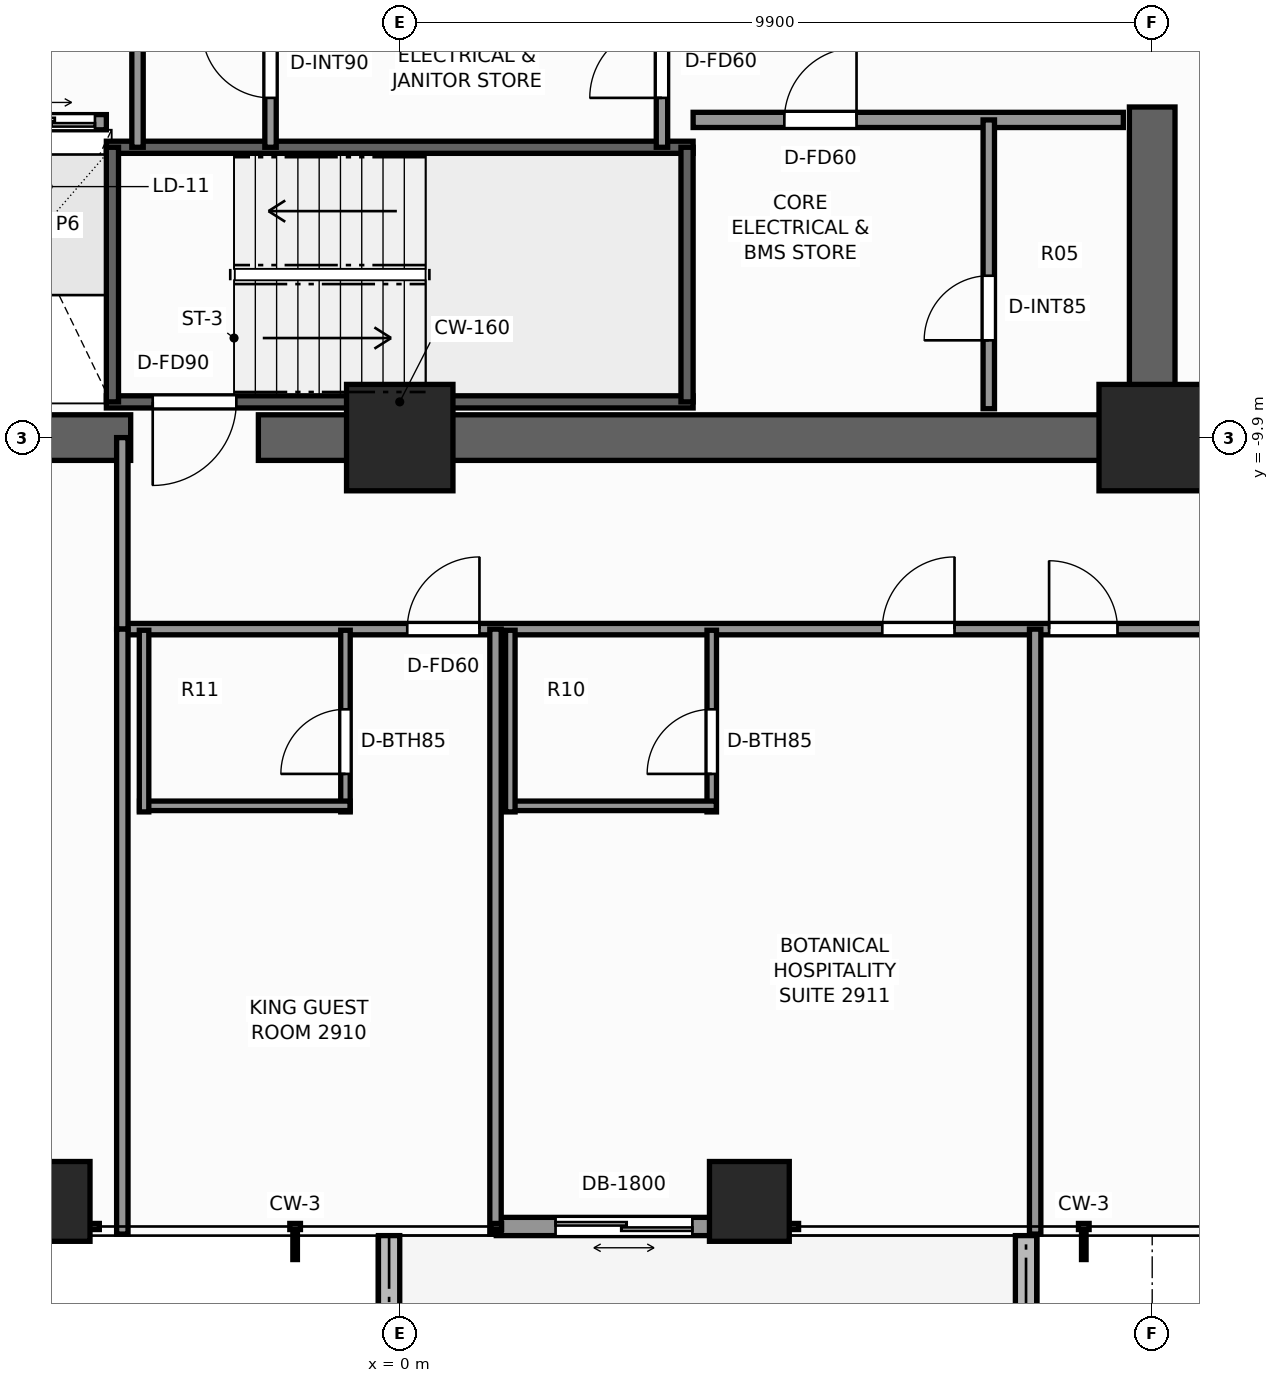
"""IFC4 building model, lengths in metres.
Left out: names, types, materials, properties, quantities, classifications, styles, units other than length and angle.
Written with IfcOpenShell. Run it as: python <this file> out.ifc"""

import sys

from ifc_helpers import new_model, si_unit, direction, frame, frame_2d, origin, origin_2d, place, context, subcontext, project, spatial, rectangle, extrude, element, fill, save


model = new_model("IFC4")
c1 = context("Model", 3, precision=1e-05, world=origin(), true_north=direction((0.0, 1.0)))
c2 = subcontext(c1, "Body", "Model", "MODEL_VIEW")
j1 = project(units=[si_unit("LENGTHUNIT", "METRE"), si_unit("PLANEANGLEUNIT", "RADIAN")], contexts=[c1])
p1 = place(None, origin())
s1 = spatial("IfcSite", under=j1, at=p1, CompositionType="ELEMENT")
p2 = place(p1, origin())
s2 = spatial("IfcBuilding", under=s1, at=p2, CompositionType="ELEMENT")
p3 = place(p2, frame((0.0, 0.0, 101.9)))
s3 = spatial("IfcBuildingStorey", under=s2, at=p3, CompositionType="ELEMENT", Elevation=101.9)
p4 = place(p3, frame((10.2, -9.9, 0.0), z_axis=(0.0, 0.0, 1.0), x_axis=(-1.0, 0.0, 0.0)))
e1 = element("IfcWall", 1, at=p4, inside=s3, PredefinedType="SHEAR", context=c2, shape_type="SweptSolid", body=[
    extrude(rectangle(XDim=12.06, YDim=0.6, at=frame_2d((6.03, 0.0))), origin(), (0.0, 0.0, 1.0), 3.3),
])
p5 = place(p3, frame((-3.54, -9.9, 0.0), z_axis=(0.0, 0.0, 1.0), x_axis=(-1.0, 0.0, 0.0)))
e2 = element("IfcWall", 2, at=p5, inside=s3, PredefinedType="SHEAR", context=c2, shape_type="SweptSolid", body=[
    extrude(rectangle(XDim=6.66, YDim=0.6, at=frame_2d((3.33, 0.0))), origin(), (0.0, 0.0, 1.0), 3.3),
])
p6 = place(p3, frame((9.9, -9.6, 0.0), z_axis=(0.0, 0.0, 1.0), x_axis=(0.0, 1.0, 0.0)))
e3 = element("IfcWall", 3, at=p6, inside=s3, PredefinedType="SHEAR", context=c2, shape_type="SweptSolid", body=[
    extrude(rectangle(XDim=4.05, YDim=0.6, at=frame_2d((2.025, 0.0))), origin(), (0.0, 0.0, 1.0), 3.3),
])
for number, where, z_axis, x_axis in (
    (4, (9.9, -9.9, 0.0), (0.0, 0.0, 1.0), (1.0, 0.0, 0.0)),
    (5, (0.0, -9.9, 0.0), (0.0, 0.0, 1.0), (1.0, 0.0, 0.0)),
):
    element("IfcColumn", number, at=place(p3, frame(where, z_axis=z_axis, x_axis=x_axis)), inside=s3, PredefinedType="COLUMN", context=c2, shape_type="SweptSolid", body=[
        extrude(rectangle(XDim=1.4, YDim=1.4, at=origin_2d()), origin(), (0.0, 0.0, 1.0), 3.3),
    ])
for number, where, z_axis, x_axis in (
    (6, (-4.6, -19.95, 0.0), (0.0, 0.0, 1.0), (1.0, 0.0, 0.0)),
    (7, (4.6, -19.95, 0.0), (0.0, 0.0, 1.0), (1.0, 0.0, 0.0)),
):
    element("IfcColumn", number, at=place(p3, frame(where, z_axis=z_axis, x_axis=x_axis)), inside=s3, PredefinedType="COLUMN", context=c2, shape_type="SweptSolid", body=[
        extrude(rectangle(XDim=1.05, YDim=1.05, at=origin_2d()), origin(), (0.0, 0.0, 1.0), 3.3),
    ])
for number, where, z_axis, x_axis in (
    (8, (8.24, -23.7, -0.04), (0.0, 0.0, 1.0), (0.0, 1.0, 0.0)),
    (9, (-0.14, -20.4, -0.04), (0.0, 0.0, 1.0), (0.0, -1.0, 0.0)),
):
    element("IfcWall", number, at=place(p3, frame(where, z_axis=z_axis, x_axis=x_axis)), inside=s3, PredefinedType="PARAPET", context=c2, shape_type="SweptSolid", body=[
        extrude(rectangle(XDim=3.3, YDim=0.28, at=frame_2d((1.65, 0.0))), origin(), (0.0, 0.0, 1.0), 0.42),
    ])
p7 = place(p3, frame((4.63, -20.28, 0.0), z_axis=(0.0, 0.0, 1.0), x_axis=(-1.0, 0.0, 0.0)))
e10 = element("IfcWall", 10, at=p7, inside=s3, PredefinedType="STANDARD", context=c2, shape_type="SweptSolid", body=[
    extrude(rectangle(XDim=3.36, YDim=0.24, at=frame_2d((1.68, 0.0))), origin(), (0.0, 0.0, 1.0), 3.08),
])
p8 = place(p7, frame((0.78, 0.0, 0.0)))
e11 = element("IfcOpeningElement", 11, at=p8, cuts=e10, PredefinedType="OPENING", context=c2, shape_type="SweptSolid", body=[
    extrude(rectangle(XDim=1.8, YDim=2.2, at=frame_2d((0.9, 1.1))), frame((0.0, 0.13, 0.0), z_axis=(0.0, -1.0, 0.0), x_axis=(1.0, 0.0, 0.0)), (0.0, 0.0, 1.0), 0.26),
])
p9 = place(p3, frame((3.86, -9.43, 0.0), z_axis=(0.0, 0.0, 1.0), x_axis=(-1.0, 0.0, 0.0)))
e12 = element("IfcWall", 12, at=p9, inside=s3, PredefinedType="SHEAR", context=c2, shape_type="SweptSolid", body=[
    extrude(rectangle(XDim=7.72, YDim=0.16, at=frame_2d((3.86, 0.0))), origin(), (0.0, 0.0, 1.0), 3.3),
])
p10 = place(p9, frame((6.01, 0.0, 0.0)))
e13 = element("IfcOpeningElement", 13, at=p10, cuts=e12, PredefinedType="OPENING", context=c2, shape_type="SweptSolid", body=[
    extrude(rectangle(XDim=1.1, YDim=2.2, at=frame_2d((0.55, 1.1))), frame((0.0, 0.09, 0.0), z_axis=(0.0, -1.0, 0.0), x_axis=(1.0, 0.0, 0.0)), (0.0, 0.0, 1.0), 0.18),
])
p11 = place(p3, frame((-3.86, -6.08, 0.0), z_axis=(0.0, 0.0, 1.0), x_axis=(1.0, 0.0, 0.0)))
e14 = element("IfcWall", 14, at=p11, inside=s3, PredefinedType="SHEAR", context=c2, shape_type="SweptSolid", body=[
    extrude(rectangle(XDim=7.72, YDim=0.16, at=frame_2d((3.86, 0.0))), origin(), (0.0, 0.0, 1.0), 3.3),
])
for number, where, z_axis, x_axis in (
    (15, (-3.78, -9.43, 0.0), (0.0, 0.0, 1.0), (0.0, 1.0, 0.0)),
    (16, (3.78, -9.43, 0.0), (0.0, 0.0, 1.0), (0.0, 1.0, 0.0)),
):
    element("IfcWall", number, at=place(p3, frame(where, z_axis=z_axis, x_axis=x_axis)), inside=s3, PredefinedType="SHEAR", context=c2, shape_type="SweptSolid", body=[
        extrude(rectangle(XDim=3.35, YDim=0.16, at=frame_2d((1.675, 0.0))), origin(), (0.0, 0.0, 1.0), 3.3),
    ])
p12 = place(p3, frame((-9.52, -5.75, 0.0), z_axis=(0.0, 0.0, 1.0), x_axis=(1.0, 0.0, 0.0)))
e17 = element("IfcWall", 17, at=p12, inside=s3, PredefinedType="SOLIDWALL", context=c2, shape_type="SweptSolid", body=[
    extrude(rectangle(XDim=5.66, YDim=0.2, at=frame_2d((2.83, 0.0))), origin(), (0.0, 0.0, 1.0), 3.08),
])
p13 = place(p12, frame((0.55, 0.0, 0.0)))
e18 = element("IfcOpeningElement", 18, at=p13, cuts=e17, PredefinedType="OPENING", context=c2, shape_type="SweptSolid", body=[
    extrude(rectangle(XDim=1.1, YDim=2.2, at=frame_2d((0.55, 1.1))), frame((0.0, 0.11, 0.0), z_axis=(0.0, -1.0, 0.0), x_axis=(1.0, 0.0, 0.0)), (0.0, 0.0, 1.0), 0.22),
])
p14 = place(p12, frame((2.48, 0.0, 0.0)))
e19 = element("IfcOpeningElement", 19, at=p14, cuts=e17, PredefinedType="OPENING", context=c2, shape_type="SweptSolid", body=[
    extrude(rectangle(XDim=1.1, YDim=2.2, at=frame_2d((0.55, 1.1))), frame((0.0, 0.11, 0.0), z_axis=(0.0, -1.0, 0.0), x_axis=(1.0, 0.0, 0.0)), (0.0, 0.0, 1.0), 0.22),
])
p15 = place(p12, frame((4.41, 0.0, 0.0)))
e20 = element("IfcOpeningElement", 20, at=p15, cuts=e17, PredefinedType="OPENING", context=c2, shape_type="SweptSolid", body=[
    extrude(rectangle(XDim=1.1, YDim=2.2, at=frame_2d((0.55, 1.1))), frame((0.0, 0.11, 0.0), z_axis=(0.0, -1.0, 0.0), x_axis=(1.0, 0.0, 0.0)), (0.0, 0.0, 1.0), 0.22),
])
p16 = place(p3, frame((3.86, -5.72, 0.0), z_axis=(0.0, 0.0, 1.0), x_axis=(1.0, 0.0, 0.0)))
e21 = element("IfcWall", 21, at=p16, inside=s3, PredefinedType="SOLIDWALL", context=c2, shape_type="SweptSolid", body=[
    extrude(rectangle(XDim=5.66, YDim=0.2, at=frame_2d((2.83, 0.0))), origin(), (0.0, 0.0, 1.0), 3.08),
])
p17 = place(p16, frame((1.2, 0.0, 0.0)))
e22 = element("IfcOpeningElement", 22, at=p17, cuts=e21, PredefinedType="OPENING", context=c2, shape_type="SweptSolid", body=[
    extrude(rectangle(XDim=0.95, YDim=2.06, at=frame_2d((0.475, 1.03))), frame((0.0, 0.11, 0.0), z_axis=(0.0, -1.0, 0.0), x_axis=(1.0, 0.0, 0.0)), (0.0, 0.0, 1.0), 0.22),
])
p18 = place(p3, frame((7.75, -9.52, 0.0), z_axis=(0.0, 0.0, 1.0), x_axis=(0.0, 1.0, 0.0)))
e23 = element("IfcWall", 23, at=p18, inside=s3, PredefinedType="PARTITIONING", context=c2, shape_type="SweptSolid", body=[
    extrude(rectangle(XDim=3.8, YDim=0.15, at=frame_2d((1.9, 0.0))), origin(), (0.0, 0.0, 1.0), 3.08),
])
p19 = place(p18, frame((0.9, 0.0, 0.0)))
e24 = element("IfcOpeningElement", 24, at=p19, cuts=e23, PredefinedType="OPENING", context=c2, shape_type="SweptSolid", body=[
    extrude(rectangle(XDim=0.85, YDim=2.03, at=frame_2d((0.425, 1.015))), frame((0.0, 0.085, 0.0), z_axis=(0.0, -1.0, 0.0), x_axis=(1.0, 0.0, 0.0)), (0.0, 0.0, 1.0), 0.17),
])
p20 = place(p3, frame((3.45, -6.08, 0.0), z_axis=(0.0, 0.0, 1.0), x_axis=(0.0, 1.0, 0.0)))
e25 = element("IfcWall", 25, at=p20, inside=s3, PredefinedType="PARTITIONING", context=c2, shape_type="SweptSolid", body=[
    extrude(rectangle(XDim=2.36, YDim=0.15, at=frame_2d((1.18, 0.0))), origin(), (0.0, 0.0, 1.0), 3.08),
])
p21 = place(p20, frame((0.65, 0.0, 0.0)))
e26 = element("IfcOpeningElement", 26, at=p21, cuts=e25, PredefinedType="OPENING", context=c2, shape_type="SweptSolid", body=[
    extrude(rectangle(XDim=0.95, YDim=2.06, at=frame_2d((0.475, 1.03))), frame((0.0, 0.085, 0.0), z_axis=(0.0, -1.0, 0.0), x_axis=(1.0, 0.0, 0.0)), (0.0, 0.0, 1.0), 0.17),
])
p22 = place(p3, frame((-3.45, -6.08, 0.0), z_axis=(0.0, 0.0, 1.0), x_axis=(0.0, 1.0, 0.0)))
e27 = element("IfcWall", 27, at=p22, inside=s3, PredefinedType="PARTITIONING", context=c2, shape_type="SweptSolid", body=[
    extrude(rectangle(XDim=2.36, YDim=0.15, at=frame_2d((1.18, 0.0))), origin(), (0.0, 0.0, 1.0), 3.08),
])
p23 = place(p3, frame((-1.7, -6.08, 0.0), z_axis=(0.0, 0.0, 1.0), x_axis=(0.0, 1.0, 0.0)))
e28 = element("IfcWall", 28, at=p23, inside=s3, PredefinedType="PARTITIONING", context=c2, shape_type="SweptSolid", body=[
    extrude(rectangle(XDim=2.36, YDim=0.15, at=frame_2d((1.18, 0.0))), origin(), (0.0, 0.0, 1.0), 3.08),
])
p24 = place(p23, frame((0.65, 0.0, 0.0)))
e29 = element("IfcOpeningElement", 29, at=p24, cuts=e28, PredefinedType="OPENING", context=c2, shape_type="SweptSolid", body=[
    extrude(rectangle(XDim=0.9, YDim=2.06, at=frame_2d((0.45, 1.03))), frame((0.0, 0.085, 0.0), z_axis=(0.0, -1.0, 0.0), x_axis=(1.0, 0.0, 0.0)), (0.0, 0.0, 1.0), 0.17),
])
p25 = place(p3, frame((-3.65, -12.42, 0.0), z_axis=(0.0, 0.0, 1.0), x_axis=(1.0, 0.0, 0.0)))
e30 = element("IfcWall", 30, at=p25, inside=s3, PredefinedType="PARTITIONING", context=c2, shape_type="SweptSolid", body=[
    extrude(rectangle(XDim=15.91, YDim=0.15, at=frame_2d((7.955, 0.0))), origin(), (0.0, 0.0, 1.0), 2.292),
])
p26 = place(p25, frame((3.749, 0.0, 0.0)))
e31 = element("IfcOpeningElement", 31, at=p26, cuts=e30, PredefinedType="OPENING", context=c2, shape_type="SweptSolid", body=[
    extrude(rectangle(XDim=0.95, YDim=2.06, at=frame_2d((0.475, 1.03))), frame((0.0, 0.085, 0.0), z_axis=(0.0, -1.0, 0.0), x_axis=(1.0, 0.0, 0.0)), (0.0, 0.0, 1.0), 0.17),
])
p27 = place(p25, frame((9.999, 0.0, 0.0)))
e32 = element("IfcOpeningElement", 32, at=p27, cuts=e30, PredefinedType="OPENING", context=c2, shape_type="SweptSolid", body=[
    extrude(rectangle(XDim=0.95, YDim=2.06, at=frame_2d((0.475, 1.03))), frame((0.0, 0.085, 0.0), z_axis=(0.0, -1.0, 0.0), x_axis=(1.0, 0.0, 0.0)), (0.0, 0.0, 1.0), 0.17),
])
p28 = place(p25, frame((12.193, 0.0, 0.0)))
e33 = element("IfcOpeningElement", 33, at=p28, cuts=e30, PredefinedType="OPENING", context=c2, shape_type="SweptSolid", body=[
    extrude(rectangle(XDim=0.9, YDim=2.06, at=frame_2d((0.45, 1.03))), frame((0.0, 0.085, 0.0), z_axis=(0.0, -1.0, 0.0), x_axis=(1.0, 0.0, 0.0)), (0.0, 0.0, 1.0), 0.17),
])
p29 = place(p3, frame((-3.65, -12.42, 0.0), z_axis=(0.0, 0.0, 1.0), x_axis=(0.0, 1.0, 0.0)))
e34 = element("IfcWall", 34, at=p29, inside=s3, PredefinedType="PARTITIONING", context=c2, shape_type="SweptSolid", body=[
    extrude(rectangle(XDim=2.52, YDim=0.15, at=frame_2d((1.26, 0.0))), origin(), (0.0, 0.0, 1.0), 3.08),
])
for number, where, z_axis, x_axis in (
    (35, (-3.65, -20.38, 0.0), (0.0, 0.0, 1.0), (0.0, 1.0, 0.0)),
    (36, (1.26, -20.38, 0.0), (0.0, 0.0, 1.0), (0.0, 1.0, 0.0)),
):
    element("IfcWall", number, at=place(p3, frame(where, z_axis=z_axis, x_axis=x_axis)), inside=s3, PredefinedType="PARTITIONING", context=c2, shape_type="SweptSolid", body=[
        extrude(rectangle(XDim=7.96, YDim=0.15, at=frame_2d((3.98, 0.0))), origin(), (0.0, 0.0, 1.0), 2.449),
    ])
p30 = place(p3, frame((-0.714, -14.825, 0.0), z_axis=(0.0, 0.0, 1.0), x_axis=(0.0, 1.0, 0.0)))
e37 = element("IfcWall", 37, at=p30, inside=s3, PredefinedType="PARTITIONING", context=c2, shape_type="SweptSolid", body=[
    extrude(rectangle(XDim=2.39, YDim=0.125, at=frame_2d((1.195, 0.0))), origin(), (0.0, 0.0, 1.0), 3.08),
])
p31 = place(p30, frame((0.5, 0.0, 0.0)))
e38 = element("IfcOpeningElement", 38, at=p31, cuts=e37, PredefinedType="OPENING", context=c2, shape_type="SweptSolid", body=[
    extrude(rectangle(XDim=0.85, YDim=2.03, at=frame_2d((0.425, 1.015))), frame((0.0, 0.073, 0.0), z_axis=(0.0, -1.0, 0.0), x_axis=(1.0, 0.0, 0.0)), (0.0, 0.0, 1.0), 0.145),
])
p32 = place(p3, frame((-3.424, -14.745, 0.0), z_axis=(0.0, 0.0, 1.0), x_axis=(1.0, 0.0, 0.0)))
e39 = element("IfcWall", 39, at=p32, inside=s3, PredefinedType="PARTITIONING", context=c2, shape_type="SweptSolid", body=[
    extrude(rectangle(XDim=2.77, YDim=0.125, at=frame_2d((1.385, 0.0))), origin(), (0.0, 0.0, 1.0), 3.08),
])
p33 = place(p3, frame((-3.364, -14.825, 0.0), z_axis=(0.0, 0.0, 1.0), x_axis=(0.0, 1.0, 0.0)))
e40 = element("IfcWall", 40, at=p33, inside=s3, PredefinedType="PARTITIONING", context=c2, shape_type="SweptSolid", body=[
    extrude(rectangle(XDim=2.39, YDim=0.125, at=frame_2d((1.195, 0.0))), origin(), (0.0, 0.0, 1.0), 3.08),
])
p34 = place(p3, frame((8.36, -20.38, 0.0), z_axis=(0.0, 0.0, 1.0), x_axis=(0.0, 1.0, 0.0)))
e41 = element("IfcWall", 41, at=p34, inside=s3, PredefinedType="PARTITIONING", context=c2, shape_type="SweptSolid", body=[
    extrude(rectangle(XDim=7.96, YDim=0.15, at=frame_2d((3.98, 0.0))), origin(), (0.0, 0.0, 1.0), 2.449),
])
p35 = place(p3, frame((4.105, -14.825, 0.0), z_axis=(0.0, 0.0, 1.0), x_axis=(0.0, 1.0, 0.0)))
e42 = element("IfcWall", 42, at=p35, inside=s3, PredefinedType="PARTITIONING", context=c2, shape_type="SweptSolid", body=[
    extrude(rectangle(XDim=2.39, YDim=0.125, at=frame_2d((1.195, 0.0))), origin(), (0.0, 0.0, 1.0), 3.08),
])
p36 = place(p35, frame((0.5, 0.0, 0.0)))
e43 = element("IfcOpeningElement", 43, at=p36, cuts=e42, PredefinedType="OPENING", context=c2, shape_type="SweptSolid", body=[
    extrude(rectangle(XDim=0.85, YDim=2.03, at=frame_2d((0.425, 1.015))), frame((0.0, 0.073, 0.0), z_axis=(0.0, -1.0, 0.0), x_axis=(1.0, 0.0, 0.0)), (0.0, 0.0, 1.0), 0.145),
])
p37 = place(p3, frame((1.395, -14.745, 0.0), z_axis=(0.0, 0.0, 1.0), x_axis=(1.0, 0.0, 0.0)))
e44 = element("IfcWall", 44, at=p37, inside=s3, PredefinedType="PARTITIONING", context=c2, shape_type="SweptSolid", body=[
    extrude(rectangle(XDim=2.77, YDim=0.125, at=frame_2d((1.385, 0.0))), origin(), (0.0, 0.0, 1.0), 3.08),
])
p38 = place(p3, frame((1.455, -14.825, 0.0), z_axis=(0.0, 0.0, 1.0), x_axis=(0.0, 1.0, 0.0)))
e45 = element("IfcWall", 45, at=p38, inside=s3, PredefinedType="PARTITIONING", context=c2, shape_type="SweptSolid", body=[
    extrude(rectangle(XDim=2.39, YDim=0.125, at=frame_2d((1.195, 0.0))), origin(), (0.0, 0.0, 1.0), 3.08),
])
p39 = place(p8, origin())
e46 = element("IfcDoor", 46, at=p39, inside=s3, OperationType="DOUBLE_DOOR_SLIDING", PredefinedType="DOOR", context=c2, shape_type="SweptSolid", body=[
    extrude(rectangle(XDim=1.8, YDim=2.2, at=frame_2d((0.9, 1.1))), frame((0.0, 0.025, 0.0), z_axis=(0.0, -1.0, 0.0), x_axis=(1.0, 0.0, 0.0)), (0.0, 0.0, 1.0), 0.05),
])
fill(e11, e46)
p40 = place(p10, origin())
e47 = element("IfcDoor", 47, at=p40, inside=s3, OperationType="SINGLE_SWING_RIGHT", PredefinedType="DOOR", context=c2, shape_type="SweptSolid", body=[
    extrude(rectangle(XDim=1.1, YDim=2.2, at=frame_2d((0.55, 1.1))), frame((0.0, 0.025, 0.0), z_axis=(0.0, -1.0, 0.0), x_axis=(1.0, 0.0, 0.0)), (0.0, 0.0, 1.0), 0.05),
])
fill(e13, e47)
p41 = place(p15, origin())
e48 = element("IfcDoor", 48, at=p41, inside=s3, OperationType="DOUBLE_DOOR_SLIDING", PredefinedType="DOOR", context=c2, shape_type="SweptSolid", body=[
    extrude(rectangle(XDim=1.1, YDim=2.2, at=frame_2d((0.55, 1.1))), frame((0.0, 0.025, 0.0), z_axis=(0.0, -1.0, 0.0), x_axis=(1.0, 0.0, 0.0)), (0.0, 0.0, 1.0), 0.05),
])
fill(e20, e48)
p42 = place(p17, origin())
e49 = element("IfcDoor", 49, at=p42, inside=s3, OperationType="SINGLE_SWING_RIGHT", PredefinedType="DOOR", context=c2, shape_type="SweptSolid", body=[
    extrude(rectangle(XDim=0.95, YDim=2.06, at=frame_2d((0.475, 1.03))), frame((0.0, 0.025, 0.0), z_axis=(0.0, -1.0, 0.0), x_axis=(1.0, 0.0, 0.0)), (0.0, 0.0, 1.0), 0.05),
])
fill(e22, e49)
p43 = place(p19, origin())
e50 = element("IfcDoor", 50, at=p43, inside=s3, OperationType="SINGLE_SWING_LEFT", PredefinedType="DOOR", context=c2, shape_type="SweptSolid", body=[
    extrude(rectangle(XDim=0.85, YDim=2.03, at=frame_2d((0.425, 1.015))), frame((0.0, 0.025, 0.0), z_axis=(0.0, -1.0, 0.0), x_axis=(1.0, 0.0, 0.0)), (0.0, 0.0, 1.0), 0.05),
])
fill(e24, e50)
p44 = place(p21, origin())
e51 = element("IfcDoor", 51, at=p44, inside=s3, OperationType="SINGLE_SWING_LEFT", PredefinedType="DOOR", context=c2, shape_type="SweptSolid", body=[
    extrude(rectangle(XDim=0.95, YDim=2.06, at=frame_2d((0.475, 1.03))), frame((0.0, 0.025, 0.0), z_axis=(0.0, -1.0, 0.0), x_axis=(1.0, 0.0, 0.0)), (0.0, 0.0, 1.0), 0.05),
])
fill(e26, e51)
p45 = place(p24, origin())
e52 = element("IfcDoor", 52, at=p45, inside=s3, OperationType="SINGLE_SWING_RIGHT", PredefinedType="DOOR", context=c2, shape_type="SweptSolid", body=[
    extrude(rectangle(XDim=0.9, YDim=2.06, at=frame_2d((0.45, 1.03))), frame((0.0, 0.025, 0.0), z_axis=(0.0, -1.0, 0.0), x_axis=(1.0, 0.0, 0.0)), (0.0, 0.0, 1.0), 0.05),
])
fill(e29, e52)
p46 = place(p31, origin())
e53 = element("IfcDoor", 53, at=p46, inside=s3, OperationType="SINGLE_SWING_LEFT", PredefinedType="DOOR", context=c2, shape_type="SweptSolid", body=[
    extrude(rectangle(XDim=0.85, YDim=2.03, at=frame_2d((0.425, 1.015))), frame((0.0, 0.025, 0.0), z_axis=(0.0, -1.0, 0.0), x_axis=(1.0, 0.0, 0.0)), (0.0, 0.0, 1.0), 0.05),
])
fill(e38, e53)
p47 = place(p26, origin())
e54 = element("IfcDoor", 54, at=p47, inside=s3, OperationType="SINGLE_SWING_RIGHT", PredefinedType="DOOR", context=c2, shape_type="SweptSolid", body=[
    extrude(rectangle(XDim=0.95, YDim=2.06, at=frame_2d((0.475, 1.03))), frame((0.0, 0.025, 0.0), z_axis=(0.0, -1.0, 0.0), x_axis=(1.0, 0.0, 0.0)), (0.0, 0.0, 1.0), 0.05),
])
fill(e31, e54)
p48 = place(p36, origin())
e55 = element("IfcDoor", 55, at=p48, inside=s3, OperationType="SINGLE_SWING_LEFT", PredefinedType="DOOR", context=c2, shape_type="SweptSolid", body=[
    extrude(rectangle(XDim=0.85, YDim=2.03, at=frame_2d((0.425, 1.015))), frame((0.0, 0.025, 0.0), z_axis=(0.0, -1.0, 0.0), x_axis=(1.0, 0.0, 0.0)), (0.0, 0.0, 1.0), 0.05),
])
fill(e43, e55)
p49 = place(p27, origin())
e56 = element("IfcDoor", 56, at=p49, inside=s3, OperationType="SINGLE_SWING_RIGHT", PredefinedType="DOOR", context=c2, shape_type="SweptSolid", body=[
    extrude(rectangle(XDim=0.95, YDim=2.06, at=frame_2d((0.475, 1.03))), frame((0.0, 0.025, 0.0), z_axis=(0.0, -1.0, 0.0), x_axis=(1.0, 0.0, 0.0)), (0.0, 0.0, 1.0), 0.05),
])
fill(e32, e56)
p50 = place(p28, origin())
e57 = element("IfcDoor", 57, at=p50, inside=s3, OperationType="SINGLE_SWING_LEFT", PredefinedType="DOOR", context=c2, shape_type="SweptSolid", body=[
    extrude(rectangle(XDim=0.9, YDim=2.06, at=frame_2d((0.45, 1.03))), frame((0.0, 0.025, 0.0), z_axis=(0.0, -1.0, 0.0), x_axis=(1.0, 0.0, 0.0)), (0.0, 0.0, 1.0), 0.05),
])
fill(e33, e57)
save(model, sys.argv[1])
